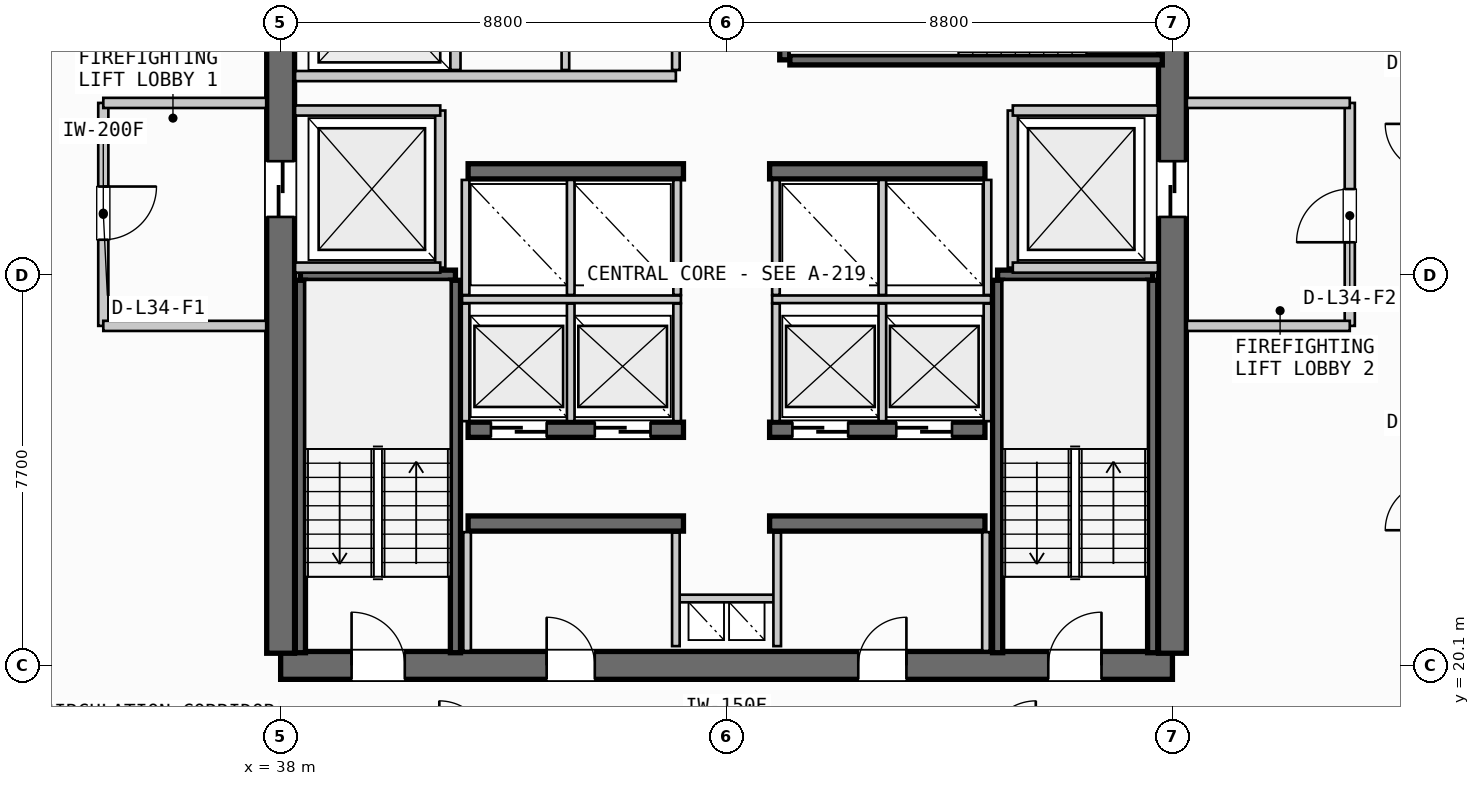
"""IFC4 building model, lengths in metres.
Left out: names, types, materials, properties, quantities, classifications, styles, units other than length and angle.
Written with IfcOpenShell. Run it as: python <this file> out.ifc"""

import sys

from ifc_helpers import new_model, si_unit, direction, frame, frame_2d, origin, place, context, subcontext, project, spatial, rectangle, extrude, source, transform, mapped, element, fill, save


model = new_model("IFC4")
c1 = context("Model", 3, precision=1e-05, world=origin(), true_north=direction((0.0, 1.0)))
c2 = subcontext(c1, "Body", "Model", "MODEL_VIEW")
j1 = project(units=[si_unit("LENGTHUNIT", "METRE"), si_unit("PLANEANGLEUNIT", "RADIAN")], contexts=[c1])
p1 = place(None, origin())
s1 = spatial("IfcSite", under=j1, at=p1, CompositionType="ELEMENT")
p2 = place(p1, origin())
s2 = spatial("IfcBuilding", under=s1, at=p2, CompositionType="ELEMENT")
p3 = place(p2, frame((0.0, 0.0, 135.9)))
s3 = spatial("IfcBuildingStorey", under=s2, at=p3, CompositionType="ELEMENT", Elevation=135.9)
p4 = place(p3, frame((38.0, 20.1, 0.0), z_axis=(0.0, 0.0, 1.0), x_axis=(1.0, 0.0, 0.0)))
e1 = element("IfcWall", 1, at=p4, inside=s3, PredefinedType="SHEAR", context=c2, shape_type="SweptSolid", body=[
    extrude(rectangle(XDim=17.6, YDim=0.55, at=frame_2d((8.8, 0.0))), origin(), (0.0, 0.0, 1.0), 3.3),
])
p5 = place(p4, frame((1.4, 0.0, 0.0)))
e2 = element("IfcOpeningElement", 2, at=p5, cuts=e1, PredefinedType="OPENING", context=c2, shape_type="SweptSolid", body=[
    extrude(rectangle(XDim=1.05, YDim=2.15, at=frame_2d((0.525, 1.075))), frame((0.0, 0.285, 0.0), z_axis=(0.0, -1.0, 0.0), x_axis=(1.0, 0.0, 0.0)), (0.0, 0.0, 1.0), 0.57),
])
p6 = place(p4, frame((15.15, 0.0, 0.0)))
e3 = element("IfcOpeningElement", 3, at=p6, cuts=e1, PredefinedType="OPENING", context=c2, shape_type="SweptSolid", body=[
    extrude(rectangle(XDim=1.05, YDim=2.15, at=frame_2d((0.525, 1.075))), frame((0.0, 0.285, 0.0), z_axis=(0.0, -1.0, 0.0), x_axis=(1.0, 0.0, 0.0)), (0.0, 0.0, 1.0), 0.57),
])
p7 = place(p4, frame((5.25, 0.0, 0.0)))
e4 = element("IfcOpeningElement", 4, at=p7, cuts=e1, PredefinedType="OPENING", context=c2, shape_type="SweptSolid", body=[
    extrude(rectangle(XDim=0.95, YDim=2.15, at=frame_2d((0.475, 1.075))), frame((0.0, 0.285, 0.0), z_axis=(0.0, -1.0, 0.0), x_axis=(1.0, 0.0, 0.0)), (0.0, 0.0, 1.0), 0.57),
])
p8 = place(p4, frame((11.4, 0.0, 0.0)))
e5 = element("IfcOpeningElement", 5, at=p8, cuts=e1, PredefinedType="OPENING", context=c2, shape_type="SweptSolid", body=[
    extrude(rectangle(XDim=0.95, YDim=2.15, at=frame_2d((0.475, 1.075))), frame((0.0, 0.285, 0.0), z_axis=(0.0, -1.0, 0.0), x_axis=(1.0, 0.0, 0.0)), (0.0, 0.0, 1.0), 0.57),
])
p9 = place(p3, frame((38.0, 35.26, 0.0), z_axis=(0.0, 0.0, 1.0), x_axis=(0.0, -1.0, 0.0)))
e6 = element("IfcWall", 6, at=p9, inside=s3, PredefinedType="SHEAR", context=c2, shape_type="SweptSolid", body=[
    extrude(rectangle(XDim=14.92, YDim=0.55, at=frame_2d((7.46, 0.0))), origin(), (0.0, 0.0, 1.0), 3.3),
])
p10 = place(p9, frame((5.21, 0.0, 0.0)))
e7 = element("IfcOpeningElement", 7, at=p10, cuts=e6, PredefinedType="OPENING", context=c2, shape_type="SweptSolid", body=[
    extrude(rectangle(XDim=1.1, YDim=2.2, at=frame_2d((0.55, 1.1))), frame((0.0, 0.285, 0.0), z_axis=(0.0, -1.0, 0.0), x_axis=(1.0, 0.0, 0.0)), (0.0, 0.0, 1.0), 0.57),
])
p11 = place(p3, frame((55.6, 20.34, 0.0), z_axis=(0.0, 0.0, 1.0), x_axis=(0.0, 1.0, 0.0)))
e8 = element("IfcWall", 8, at=p11, inside=s3, PredefinedType="SHEAR", context=c2, shape_type="SweptSolid", body=[
    extrude(rectangle(XDim=14.92, YDim=0.55, at=frame_2d((7.46, 0.0))), origin(), (0.0, 0.0, 1.0), 3.3),
])
p12 = place(p11, frame((12.71, 0.0, 0.0)))
e9 = element("IfcOpeningElement", 9, at=p12, cuts=e8, PredefinedType="OPENING", context=c2, shape_type="SweptSolid", body=[
    extrude(rectangle(XDim=1.05, YDim=2.15, at=frame_2d((0.525, 1.075))), frame((0.0, 0.285, 0.0), z_axis=(0.0, -1.0, 0.0), x_axis=(1.0, 0.0, 0.0)), (0.0, 0.0, 1.0), 0.57),
])
p13 = place(p11, frame((8.61, 0.0, 0.0)))
e10 = element("IfcOpeningElement", 10, at=p13, cuts=e8, PredefinedType="OPENING", context=c2, shape_type="SweptSolid", body=[
    extrude(rectangle(XDim=1.1, YDim=2.2, at=frame_2d((0.55, 1.1))), frame((0.0, 0.285, 0.0), z_axis=(0.0, -1.0, 0.0), x_axis=(1.0, 0.0, 0.0)), (0.0, 0.0, 1.0), 0.57),
])
for number, where, z_axis, x_axis in (
    (11, (41.7, 22.9, 0.0), (0.0, 0.0, 1.0), (1.0, 0.0, 0.0)),
    (12, (47.65, 22.9, 0.0), (0.0, 0.0, 1.0), (1.0, 0.0, 0.0)),
):
    element("IfcWall", number, at=place(p3, frame(where, z_axis=z_axis, x_axis=x_axis)), inside=s3, PredefinedType="SHEAR", context=c2, shape_type="SweptSolid", body=[
        extrude(rectangle(XDim=4.25, YDim=0.3, at=frame_2d((2.125, 0.0))), origin(), (0.0, 0.0, 1.0), 3.3),
    ])
p14 = place(p3, frame((41.7, 24.75, 0.0), z_axis=(0.0, 0.0, 1.0), x_axis=(1.0, 0.0, 0.0)))
e13 = element("IfcWall", 13, at=p14, inside=s3, PredefinedType="SHEAR", context=c2, shape_type="SweptSolid", body=[
    extrude(rectangle(XDim=4.25, YDim=0.3, at=frame_2d((2.125, 0.0))), origin(), (0.0, 0.0, 1.0), 3.3),
])
p15 = place(p14, frame((0.45, 0.0, 0.0)))
e14 = element("IfcOpeningElement", 14, at=p15, cuts=e13, PredefinedType="OPENING", context=c2, shape_type="SweptSolid", body=[
    extrude(rectangle(XDim=1.1, YDim=2.2, at=frame_2d((0.55, 1.1))), frame((0.0, 0.16, 0.0), z_axis=(0.0, -1.0, 0.0), x_axis=(1.0, 0.0, 0.0)), (0.0, 0.0, 1.0), 0.32),
])
p16 = place(p14, frame((2.5, 0.0, 0.0)))
e15 = element("IfcOpeningElement", 15, at=p16, cuts=e13, PredefinedType="OPENING", context=c2, shape_type="SweptSolid", body=[
    extrude(rectangle(XDim=1.1, YDim=2.2, at=frame_2d((0.55, 1.1))), frame((0.0, 0.16, 0.0), z_axis=(0.0, -1.0, 0.0), x_axis=(1.0, 0.0, 0.0)), (0.0, 0.0, 1.0), 0.32),
])
p17 = place(p3, frame((47.65, 24.75, 0.0), z_axis=(0.0, 0.0, 1.0), x_axis=(1.0, 0.0, 0.0)))
e16 = element("IfcWall", 16, at=p17, inside=s3, PredefinedType="SHEAR", context=c2, shape_type="SweptSolid", body=[
    extrude(rectangle(XDim=4.25, YDim=0.3, at=frame_2d((2.125, 0.0))), origin(), (0.0, 0.0, 1.0), 3.3),
])
p18 = place(p17, frame((0.45, 0.0, 0.0)))
e17 = element("IfcOpeningElement", 17, at=p18, cuts=e16, PredefinedType="OPENING", context=c2, shape_type="SweptSolid", body=[
    extrude(rectangle(XDim=1.1, YDim=2.2, at=frame_2d((0.55, 1.1))), frame((0.0, 0.16, 0.0), z_axis=(0.0, -1.0, 0.0), x_axis=(1.0, 0.0, 0.0)), (0.0, 0.0, 1.0), 0.32),
])
p19 = place(p17, frame((2.5, 0.0, 0.0)))
e18 = element("IfcOpeningElement", 18, at=p19, cuts=e16, PredefinedType="OPENING", context=c2, shape_type="SweptSolid", body=[
    extrude(rectangle(XDim=1.1, YDim=2.2, at=frame_2d((0.55, 1.1))), frame((0.0, 0.16, 0.0), z_axis=(0.0, -1.0, 0.0), x_axis=(1.0, 0.0, 0.0)), (0.0, 0.0, 1.0), 0.32),
])
for number, where, z_axis, x_axis in (
    (19, (41.7, 29.85, 0.0), (0.0, 0.0, 1.0), (1.0, 0.0, 0.0)),
    (20, (47.65, 29.85, 0.0), (0.0, 0.0, 1.0), (1.0, 0.0, 0.0)),
):
    element("IfcWall", number, at=place(p3, frame(where, z_axis=z_axis, x_axis=x_axis)), inside=s3, PredefinedType="SHEAR", context=c2, shape_type="SweptSolid", body=[
        extrude(rectangle(XDim=4.25, YDim=0.3, at=frame_2d((2.125, 0.0))), origin(), (0.0, 0.0, 1.0), 3.3),
    ])
p20 = place(p3, frame((38.39, 27.8, 0.0), z_axis=(0.0, 0.0, 1.0), x_axis=(1.0, 0.0, 0.0)))
e21 = element("IfcWall", 21, at=p20, inside=s3, PredefinedType="SHEAR", context=c2, shape_type="SweptSolid", body=[
    extrude(rectangle(XDim=3.06, YDim=0.2, at=frame_2d((1.53, 0.0))), origin(), (0.0, 0.0, 1.0), 3.3),
])
for number, where, z_axis, x_axis in (
    (22, (41.45, 27.7, 0.0), (0.0, 0.0, 1.0), (0.0, -1.0, 0.0)),
    (23, (38.39, 20.35, 0.0), (0.0, 0.0, 1.0), (0.0, 1.0, 0.0)),
):
    element("IfcWall", number, at=place(p3, frame(where, z_axis=z_axis, x_axis=x_axis)), inside=s3, PredefinedType="SHEAR", context=c2, shape_type="SweptSolid", body=[
        extrude(rectangle(XDim=7.35, YDim=0.2, at=frame_2d((3.675, 0.0))), origin(), (0.0, 0.0, 1.0), 3.3),
    ])
p21 = place(p3, frame((52.15, 27.8, 0.0), z_axis=(0.0, 0.0, 1.0), x_axis=(1.0, 0.0, 0.0)))
e24 = element("IfcWall", 24, at=p21, inside=s3, PredefinedType="SHEAR", context=c2, shape_type="SweptSolid", body=[
    extrude(rectangle(XDim=3.06, YDim=0.2, at=frame_2d((1.53, 0.0))), origin(), (0.0, 0.0, 1.0), 3.3),
])
for number, where, z_axis, x_axis in (
    (25, (55.21, 27.7, 0.0), (0.0, 0.0, 1.0), (0.0, -1.0, 0.0)),
    (26, (52.15, 20.35, 0.0), (0.0, 0.0, 1.0), (0.0, 1.0, 0.0)),
):
    element("IfcWall", number, at=place(p3, frame(where, z_axis=z_axis, x_axis=x_axis)), inside=s3, PredefinedType="SHEAR", context=c2, shape_type="SweptSolid", body=[
        extrude(rectangle(XDim=7.35, YDim=0.2, at=frame_2d((3.675, 0.0))), origin(), (0.0, 0.0, 1.0), 3.3),
    ])
p22 = place(p3, frame((47.95, 32.05, 0.0), z_axis=(0.0, 0.0, 1.0), x_axis=(0.0, 1.0, 0.0)))
e27 = element("IfcWall", 27, at=p22, inside=s3, PredefinedType="SHEAR", context=c2, shape_type="SweptSolid", body=[
    extrude(rectangle(XDim=3.06, YDim=0.2, at=frame_2d((1.53, 0.0))), origin(), (0.0, 0.0, 1.0), 3.3),
])
p23 = place(p3, frame((55.4, 32.05, 0.0), z_axis=(0.0, 0.0, 1.0), x_axis=(-1.0, 0.0, 0.0)))
e28 = element("IfcWall", 28, at=p23, inside=s3, PredefinedType="SHEAR", context=c2, shape_type="SweptSolid", body=[
    extrude(rectangle(XDim=7.35, YDim=0.2, at=frame_2d((3.675, 0.0))), origin(), (0.0, 0.0, 1.0), 3.3),
])
p24 = place(p3, frame((45.8, 21.42, 0.0), z_axis=(0.0, 0.0, 1.0), x_axis=(1.0, 0.0, 0.0)))
e29 = element("IfcWall", 29, at=p24, inside=s3, PredefinedType="PARTITIONING", context=c2, shape_type="SweptSolid", body=[
    extrude(rectangle(XDim=2.0, YDim=0.15, at=frame_2d((1.0, 0.0))), origin(), (0.0, 0.0, 1.0), 2.445),
])
for number, where, z_axis, x_axis in (
    (30, (45.8, 20.48, 0.0), (0.0, 0.0, 1.0), (0.0, 1.0, 0.0)),
    (31, (47.8, 20.48, 0.0), (0.0, 0.0, 1.0), (0.0, 1.0, 0.0)),
):
    element("IfcWall", number, at=place(p3, frame(where, z_axis=z_axis, x_axis=x_axis)), inside=s3, PredefinedType="PARTITIONING", context=c2, shape_type="SweptSolid", body=[
        extrude(rectangle(XDim=2.24, YDim=0.15, at=frame_2d((1.12, 0.0))), origin(), (0.0, 0.0, 1.0), 2.445),
    ])
p25 = place(p3, frame((41.15, 27.95, 0.0), z_axis=(0.0, 0.0, 1.0), x_axis=(0.0, 1.0, 0.0)))
e32 = element("IfcWall", 32, at=p25, inside=s3, PredefinedType="PARTITIONING", context=c2, shape_type="SweptSolid", body=[
    extrude(rectangle(XDim=3.1, YDim=0.2, at=frame_2d((1.55, 0.0))), origin(), (0.0, 0.0, 1.0), 2.445),
])
for number, where, z_axis, x_axis in (
    (33, (38.285, 27.95, 0.0), (0.0, 0.0, 1.0), (1.0, 0.0, 0.0)),
    (34, (38.285, 31.05, 0.0), (0.0, 0.0, 1.0), (1.0, 0.0, 0.0)),
):
    element("IfcWall", number, at=place(p3, frame(where, z_axis=z_axis, x_axis=x_axis)), inside=s3, PredefinedType="PARTITIONING", context=c2, shape_type="SweptSolid", body=[
        extrude(rectangle(XDim=2.865, YDim=0.2, at=frame_2d((1.433, 0.0))), origin(), (0.0, 0.0, 1.0), 2.445),
    ])
p26 = place(p3, frame((34.5, 31.2, 0.0), z_axis=(0.0, 0.0, 1.0), x_axis=(0.0, -1.0, 0.0)))
e35 = element("IfcWall", 35, at=p26, inside=s3, PredefinedType="PARTITIONING", context=c2, shape_type="SweptSolid", body=[
    extrude(rectangle(XDim=4.4, YDim=0.2, at=frame_2d((2.2, 0.0))), origin(), (0.0, 0.0, 1.0), 2.445),
])
p27 = place(p26, frame((1.65, 0.0, 0.0)))
e36 = element("IfcOpeningElement", 36, at=p27, cuts=e35, PredefinedType="OPENING", context=c2, shape_type="SweptSolid", body=[
    extrude(rectangle(XDim=1.05, YDim=2.15, at=frame_2d((0.525, 1.075))), frame((0.0, 0.11, 0.0), z_axis=(0.0, -1.0, 0.0), x_axis=(1.0, 0.0, 0.0)), (0.0, 0.0, 1.0), 0.22),
])
for number, where, z_axis, x_axis in (
    (37, (34.5, 26.8, 0.0), (0.0, 0.0, 1.0), (1.0, 0.0, 0.0)),
    (38, (34.5, 31.2, 0.0), (0.0, 0.0, 1.0), (1.0, 0.0, 0.0)),
):
    element("IfcWall", number, at=place(p3, frame(where, z_axis=z_axis, x_axis=x_axis)), inside=s3, PredefinedType="PARTITIONING", context=c2, shape_type="SweptSolid", body=[
        extrude(rectangle(XDim=3.215, YDim=0.2, at=frame_2d((1.607, 0.0))), origin(), (0.0, 0.0, 1.0), 2.445),
    ])
p28 = place(p3, frame((52.45, 27.95, 0.0), z_axis=(0.0, 0.0, 1.0), x_axis=(0.0, 1.0, 0.0)))
e39 = element("IfcWall", 39, at=p28, inside=s3, PredefinedType="PARTITIONING", context=c2, shape_type="SweptSolid", body=[
    extrude(rectangle(XDim=3.1, YDim=0.2, at=frame_2d((1.55, 0.0))), origin(), (0.0, 0.0, 1.0), 2.445),
])
for number, where, z_axis, x_axis in (
    (40, (52.45, 27.95, 0.0), (0.0, 0.0, 1.0), (1.0, 0.0, 0.0)),
    (41, (52.45, 31.05, 0.0), (0.0, 0.0, 1.0), (1.0, 0.0, 0.0)),
):
    element("IfcWall", number, at=place(p3, frame(where, z_axis=z_axis, x_axis=x_axis)), inside=s3, PredefinedType="PARTITIONING", context=c2, shape_type="SweptSolid", body=[
        extrude(rectangle(XDim=2.865, YDim=0.2, at=frame_2d((1.433, 0.0))), origin(), (0.0, 0.0, 1.0), 2.445),
    ])
p29 = place(p3, frame((59.1, 26.8, 0.0), z_axis=(0.0, 0.0, 1.0), x_axis=(0.0, 1.0, 0.0)))
e42 = element("IfcWall", 42, at=p29, inside=s3, PredefinedType="PARTITIONING", context=c2, shape_type="SweptSolid", body=[
    extrude(rectangle(XDim=4.4, YDim=0.2, at=frame_2d((2.2, 0.0))), origin(), (0.0, 0.0, 1.0), 2.445),
])
p30 = place(p29, frame((1.65, 0.0, 0.0)))
e43 = element("IfcOpeningElement", 43, at=p30, cuts=e42, PredefinedType="OPENING", context=c2, shape_type="SweptSolid", body=[
    extrude(rectangle(XDim=1.05, YDim=2.15, at=frame_2d((0.525, 1.075))), frame((0.0, 0.11, 0.0), z_axis=(0.0, -1.0, 0.0), x_axis=(1.0, 0.0, 0.0)), (0.0, 0.0, 1.0), 0.22),
])
for number, where, z_axis, x_axis in (
    (44, (55.885, 26.8, 0.0), (0.0, 0.0, 1.0), (1.0, 0.0, 0.0)),
    (45, (55.885, 31.2, 0.0), (0.0, 0.0, 1.0), (1.0, 0.0, 0.0)),
):
    element("IfcWall", number, at=place(p3, frame(where, z_axis=z_axis, x_axis=x_axis)), inside=s3, PredefinedType="PARTITIONING", context=c2, shape_type="SweptSolid", body=[
        extrude(rectangle(XDim=3.215, YDim=0.2, at=frame_2d((1.607, 0.0))), origin(), (0.0, 0.0, 1.0), 2.445),
    ])
for number, where, z_axis, x_axis in (
    (46, (41.68, 20.385, 0.0), (0.0, 0.0, 1.0), (0.0, 1.0, 0.0)),
    (47, (51.92, 20.385, 0.0), (0.0, 0.0, 1.0), (0.0, 1.0, 0.0)),
):
    element("IfcWall", number, at=place(p3, frame(where, z_axis=z_axis, x_axis=x_axis)), inside=s3, PredefinedType="PARTITIONING", context=c2, shape_type="SweptSolid", body=[
        extrude(rectangle(XDim=2.345, YDim=0.15, at=frame_2d((1.172, 0.0))), origin(), (0.0, 0.0, 1.0), 2.445),
    ])
p31 = place(p3, frame((41.58, 27.325, 0.0), z_axis=(0.0, 0.0, 1.0), x_axis=(1.0, 0.0, 0.0)))
e48 = element("IfcWall", 48, at=p31, inside=s3, PredefinedType="PARTITIONING", context=c2, shape_type="SweptSolid", body=[
    extrude(rectangle(XDim=4.32, YDim=0.15, at=frame_2d((2.16, 0.0))), origin(), (0.0, 0.0, 1.0), 2.445),
])
p32 = place(p3, frame((47.7, 27.325, 0.0), z_axis=(0.0, 0.0, 1.0), x_axis=(1.0, 0.0, 0.0)))
e49 = element("IfcWall", 49, at=p32, inside=s3, PredefinedType="PARTITIONING", context=c2, shape_type="SweptSolid", body=[
    extrude(rectangle(XDim=4.32, YDim=0.15, at=frame_2d((2.16, 0.0))), origin(), (0.0, 0.0, 1.0), 2.445),
])
for number, where, z_axis, x_axis in (
    (50, (41.65, 24.92, 0.0), (0.0, 0.0, 1.0), (0.0, 1.0, 0.0)),
    (51, (43.725, 24.92, 0.0), (0.0, 0.0, 1.0), (0.0, 1.0, 0.0)),
    (52, (45.825, 24.92, 0.0), (0.0, 0.0, 1.0), (0.0, 1.0, 0.0)),
    (53, (47.775, 24.92, 0.0), (0.0, 0.0, 1.0), (0.0, 1.0, 0.0)),
    (54, (49.875, 24.92, 0.0), (0.0, 0.0, 1.0), (0.0, 1.0, 0.0)),
    (55, (51.95, 24.92, 0.0), (0.0, 0.0, 1.0), (0.0, 1.0, 0.0)),
):
    element("IfcWall", number, at=place(p3, frame(where, z_axis=z_axis, x_axis=x_axis)), inside=s3, PredefinedType="PARTITIONING", context=c2, shape_type="SweptSolid", body=[
        extrude(rectangle(XDim=2.32, YDim=0.15, at=frame_2d((1.16, 0.0))), origin(), (0.0, 0.0, 1.0), 2.445),
    ])
for number, where, z_axis, x_axis in (
    (56, (41.65, 27.41, 0.0), (0.0, 0.0, 1.0), (0.0, 1.0, 0.0)),
    (57, (43.725, 27.41, 0.0), (0.0, 0.0, 1.0), (0.0, 1.0, 0.0)),
    (58, (45.825, 27.41, 0.0), (0.0, 0.0, 1.0), (0.0, 1.0, 0.0)),
    (59, (47.775, 27.41, 0.0), (0.0, 0.0, 1.0), (0.0, 1.0, 0.0)),
    (60, (49.875, 27.41, 0.0), (0.0, 0.0, 1.0), (0.0, 1.0, 0.0)),
    (61, (51.95, 27.41, 0.0), (0.0, 0.0, 1.0), (0.0, 1.0, 0.0)),
):
    element("IfcWall", number, at=place(p3, frame(where, z_axis=z_axis, x_axis=x_axis)), inside=s3, PredefinedType="PARTITIONING", context=c2, shape_type="SweptSolid", body=[
        extrude(rectangle(XDim=2.27, YDim=0.15, at=frame_2d((1.135, 0.0))), origin(), (0.0, 0.0, 1.0), 2.445),
    ])
p33 = place(p3, frame((41.45, 31.85, 0.0), z_axis=(0.0, 0.0, 1.0), x_axis=(0.0, 1.0, 0.0)))
e62 = element("IfcWall", 62, at=p33, inside=s3, PredefinedType="PARTITIONING", context=c2, shape_type="SweptSolid", body=[
    extrude(rectangle(XDim=3.365, YDim=0.2, at=frame_2d((1.683, 0.0))), origin(), (0.0, 0.0, 1.0), 2.445),
])
p34 = place(p3, frame((38.285, 31.73, 0.0), z_axis=(0.0, 0.0, 1.0), x_axis=(1.0, 0.0, 0.0)))
e63 = element("IfcWall", 63, at=p34, inside=s3, PredefinedType="PARTITIONING", context=c2, shape_type="SweptSolid", body=[
    extrude(rectangle(XDim=7.515, YDim=0.2, at=frame_2d((3.758, 0.0))), origin(), (0.0, 0.0, 1.0), 2.445),
])
p35 = place(p3, frame((45.8, 31.85, 0.0), z_axis=(0.0, 0.0, 1.0), x_axis=(0.0, 1.0, 0.0)))
e64 = element("IfcWall", 64, at=p35, inside=s3, PredefinedType="PARTITIONING", context=c2, shape_type="SweptSolid", body=[
    extrude(rectangle(XDim=3.365, YDim=0.15, at=frame_2d((1.683, 0.0))), origin(), (0.0, 0.0, 1.0), 2.445),
])
p36 = place(p3, frame((43.62, 31.85, 0.0), z_axis=(0.0, 0.0, 1.0), x_axis=(0.0, 1.0, 0.0)))
e65 = element("IfcWall", 65, at=p36, inside=s3, PredefinedType="PLUMBINGWALL", context=c2, shape_type="SweptSolid", body=[
    extrude(rectangle(XDim=3.365, YDim=0.15, at=frame_2d((1.683, 0.0))), origin(), (0.0, 0.0, 1.0), 2.445),
])
m1 = source(origin(), c2, "Body", "SweptSolid", [
    extrude(rectangle(XDim=1.05, YDim=2.15, at=frame_2d((0.525, 1.075))), frame((0.0, 0.025, 0.0), z_axis=(0.0, -1.0, 0.0), x_axis=(1.0, 0.0, 0.0)), (0.0, 0.0, 1.0), 0.05),
])
p37 = place(p5, origin())
e66 = element("IfcDoor", 66, at=p37, inside=s3, OperationType="SINGLE_SWING_LEFT", PredefinedType="DOOR", context=c2, shape_type="MappedRepresentation", body=[
    mapped(m1, transform((0.0, 0.0, 0.0), scale=1.0)),
])
fill(e2, e66)
p38 = place(p6, origin())
e67 = element("IfcDoor", 67, at=p38, inside=s3, OperationType="SINGLE_SWING_RIGHT", PredefinedType="DOOR", context=c2, shape_type="MappedRepresentation", body=[
    mapped(m1, transform((0.0, 0.0, 0.0), scale=1.0)),
])
fill(e3, e67)
m2 = source(origin(), c2, "Body", "SweptSolid", [
    extrude(rectangle(XDim=1.1, YDim=2.2, at=frame_2d((0.55, 1.1))), frame((0.0, 0.025, 0.0), z_axis=(0.0, -1.0, 0.0), x_axis=(1.0, 0.0, 0.0)), (0.0, 0.0, 1.0), 0.05),
])
p39 = place(p10, origin())
e68 = element("IfcDoor", 68, at=p39, inside=s3, OperationType="SLIDING_TO_LEFT", PredefinedType="DOOR", context=c2, shape_type="MappedRepresentation", body=[
    mapped(m2, transform((0.0, 0.0, 0.0), scale=1.0)),
])
fill(e7, e68)
p40 = place(p13, origin())
e69 = element("IfcDoor", 69, at=p40, inside=s3, OperationType="SLIDING_TO_RIGHT", PredefinedType="DOOR", context=c2, shape_type="MappedRepresentation", body=[
    mapped(m2, transform((0.0, 0.0, 0.0), scale=1.0)),
])
fill(e10, e69)
m3 = source(origin(), c2, "Body", "SweptSolid", [
    extrude(rectangle(XDim=0.95, YDim=2.15, at=frame_2d((0.475, 1.075))), frame((0.0, 0.025, 0.0), z_axis=(0.0, -1.0, 0.0), x_axis=(1.0, 0.0, 0.0)), (0.0, 0.0, 1.0), 0.05),
])
p41 = place(p7, origin())
e70 = element("IfcDoor", 70, at=p41, inside=s3, OperationType="SINGLE_SWING_LEFT", PredefinedType="DOOR", context=c2, shape_type="MappedRepresentation", body=[
    mapped(m3, transform((0.0, 0.0, 0.0), scale=1.0)),
])
fill(e4, e70)
p42 = place(p8, origin())
e71 = element("IfcDoor", 71, at=p42, inside=s3, OperationType="SINGLE_SWING_RIGHT", PredefinedType="DOOR", context=c2, shape_type="MappedRepresentation", body=[
    mapped(m3, transform((0.0, 0.0, 0.0), scale=1.0)),
])
fill(e5, e71)
p43 = place(p15, origin())
e72 = element("IfcDoor", 72, at=p43, inside=s3, OperationType="SLIDING_TO_RIGHT", PredefinedType="DOOR", context=c2, shape_type="MappedRepresentation", body=[
    mapped(m2, transform((0.0, 0.0, 0.0), scale=1.0)),
])
fill(e14, e72)
p44 = place(p16, origin())
e73 = element("IfcDoor", 73, at=p44, inside=s3, OperationType="SLIDING_TO_RIGHT", PredefinedType="DOOR", context=c2, shape_type="MappedRepresentation", body=[
    mapped(m2, transform((0.0, 0.0, 0.0), scale=1.0)),
])
fill(e15, e73)
p45 = place(p18, origin())
e74 = element("IfcDoor", 74, at=p45, inside=s3, OperationType="SLIDING_TO_RIGHT", PredefinedType="DOOR", context=c2, shape_type="MappedRepresentation", body=[
    mapped(m2, transform((0.0, 0.0, 0.0), scale=1.0)),
])
fill(e17, e74)
p46 = place(p19, origin())
e75 = element("IfcDoor", 75, at=p46, inside=s3, OperationType="SLIDING_TO_RIGHT", PredefinedType="DOOR", context=c2, shape_type="MappedRepresentation", body=[
    mapped(m2, transform((0.0, 0.0, 0.0), scale=1.0)),
])
fill(e18, e75)
p47 = place(p27, origin())
e76 = element("IfcDoor", 76, at=p47, inside=s3, OperationType="SINGLE_SWING_LEFT", PredefinedType="DOOR", context=c2, shape_type="MappedRepresentation", body=[
    mapped(m1, transform((0.0, 0.0, 0.0), scale=1.0)),
])
fill(e36, e76)
p48 = place(p30, origin())
e77 = element("IfcDoor", 77, at=p48, inside=s3, OperationType="SINGLE_SWING_LEFT", PredefinedType="DOOR", context=c2, shape_type="MappedRepresentation", body=[
    mapped(m1, transform((0.0, 0.0, 0.0), scale=1.0)),
])
fill(e43, e77)
save(model, sys.argv[1])
